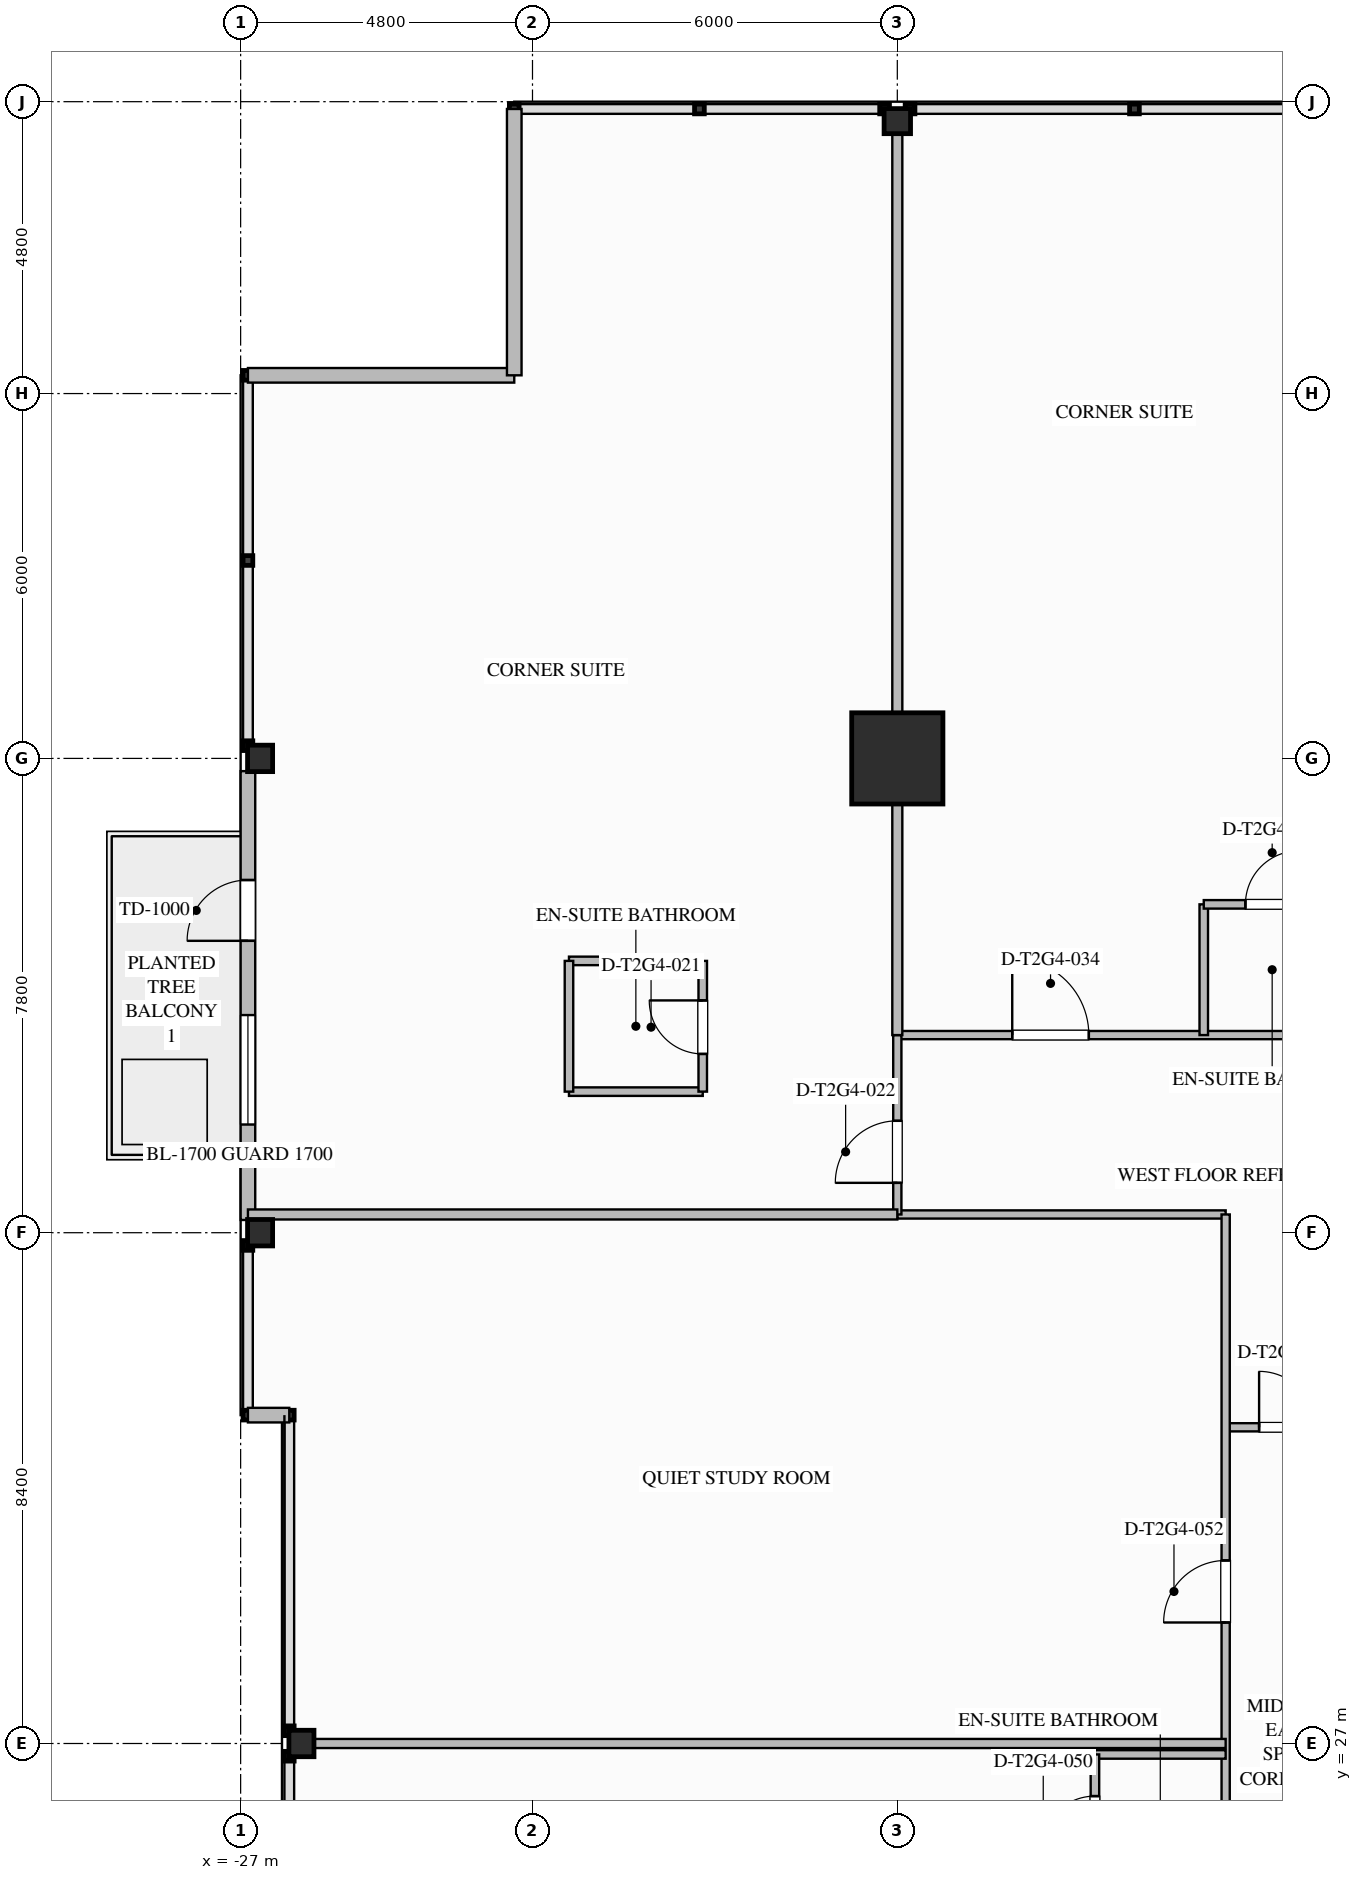
"""IFC4 building model, lengths in metres.
Left out: names, types, materials, properties, quantities, classifications, styles, units other than length and angle.
Written with IfcOpenShell. Run it as: python <this file> out.ifc"""

import sys

from ifc_helpers import new_model, si_unit, direction, frame, frame_2d, origin, origin_2d, place, context, subcontext, project, spatial, rectangle, i_section, extrude, element, fill, save


model = new_model("IFC4")
c1 = context("Model", 3, precision=1e-05, world=origin(), true_north=direction((0.0, 1.0)))
c2 = subcontext(c1, "Body", "Model", "MODEL_VIEW")
j1 = project(units=[si_unit("LENGTHUNIT", "METRE"), si_unit("PLANEANGLEUNIT", "RADIAN")], contexts=[c1])
p1 = place(None, origin())
s1 = spatial("IfcSite", under=j1, at=p1, CompositionType="ELEMENT")
p2 = place(p1, origin())
s2 = spatial("IfcBuilding", under=s1, at=p2, CompositionType="ELEMENT")
p3 = place(p2, frame((0.0, 0.0, 123.3)))
s3 = spatial("IfcBuildingStorey", under=s2, at=p3, CompositionType="ELEMENT", Elevation=123.3)
p4 = place(p3, frame((-16.2, 43.2, 0.0), z_axis=(0.0, 0.0, 1.0), x_axis=(1.0, 0.0, 0.0)))
e1 = element("IfcColumn", 1, at=p4, inside=s3, PredefinedType="COLUMN", context=c2, shape_type="SweptSolid", body=[
    extrude(rectangle(XDim=1.5, YDim=1.5, at=origin_2d()), origin(), (0.0, 0.0, 1.0), 3.5),
])
for number, where, z_axis, x_axis in (
    (2, (-26.0, 27.0, 0.0), (0.0, 0.0, 1.0), (1.0, 0.0, 0.0)),
    (3, (-26.68, 35.4, 0.0), (0.0, 0.0, 1.0), (1.0, 0.0, 0.0)),
    (4, (-26.68, 43.2, 0.0), (0.0, 0.0, 1.0), (1.0, 0.0, 0.0)),
    (5, (-16.2, 53.68, 0.0), (0.0, 0.0, 1.0), (0.0, 1.0, 0.0)),
):
    element("IfcColumn", number, at=place(p3, frame(where, z_axis=z_axis, x_axis=x_axis)), inside=s3, PredefinedType="COLUMN", context=c2, shape_type="SweptSolid", body=[
        extrude(i_section(OverallWidth=0.412, OverallDepth=0.435, WebThickness=0.036, FlangeThickness=0.057, FilletRadius=0.028, at=origin_2d()), origin(), (0.0, 0.0, 1.0), 3.497),
    ])
p5 = place(p3, frame((-26.88, 35.609, 0.0), z_axis=(0.0, 0.0, 1.0), x_axis=(0.0, 1.0, 0.0)))
e6 = element("IfcWall", 6, at=p5, inside=s3, PredefinedType="STANDARD", context=c2, shape_type="SweptSolid", body=[
    extrude(rectangle(XDim=7.381, YDim=0.24, at=frame_2d((3.69, 0.0))), origin(), (0.0, 0.0, 1.0), 2.629),
])
p6 = place(p5, frame((4.591, 0.0, 0.0)))
e7 = element("IfcOpeningElement", 7, at=p6, cuts=e6, PredefinedType="OPENING", context=c2, shape_type="SweptSolid", body=[
    extrude(rectangle(XDim=1.0, YDim=2.2, at=frame_2d((0.5, 1.1))), frame((0.0, 0.13, 0.0), z_axis=(0.0, -1.0, 0.0), x_axis=(1.0, 0.0, 0.0)), (0.0, 0.0, 1.0), 0.26),
])
p7 = place(p5, frame((1.57, 0.0, 0.75)))
e8 = element("IfcOpeningElement", 8, at=p7, cuts=e6, PredefinedType="OPENING", context=c2, shape_type="SweptSolid", body=[
    extrude(rectangle(XDim=1.8, YDim=1.779, at=frame_2d((0.9, 0.89))), frame((0.0, 0.13, 0.0), z_axis=(0.0, -1.0, 0.0), x_axis=(1.0, 0.0, 0.0)), (0.0, 0.0, 1.0), 0.26),
])
for number, where, z_axis, x_axis in (
    (9, (-26.88, 49.5, 0.0), (0.0, 0.0, 1.0), (1.0, 0.0, 0.0)),
    (10, (-22.5, 49.5, 0.0), (0.0, 0.0, 1.0), (0.0, 1.0, 0.0)),
):
    element("IfcWall", number, at=place(p3, frame(where, z_axis=z_axis, x_axis=x_axis)), inside=s3, PredefinedType="STANDARD", context=c2, shape_type="SweptSolid", body=[
        extrude(rectangle(XDim=4.38, YDim=0.24, at=frame_2d((2.19, 0.0))), origin(), (0.0, 0.0, 1.0), 3.24),
    ])
p8 = place(p3, frame((-26.2, 32.4, 0.0), z_axis=(0.0, 0.0, 1.0), x_axis=(-1.0, 0.0, 0.0)))
e11 = element("IfcWall", 11, at=p8, inside=s3, PredefinedType="STANDARD", context=c2, shape_type="SweptSolid", body=[
    extrude(rectangle(XDim=0.68, YDim=0.24, at=frame_2d((0.34, 0.0))), origin(), (0.0, 0.0, 1.0), 3.24),
])
p9 = place(p3, frame((-10.8, 32.2, 0.0), z_axis=(0.0, 0.0, 1.0), x_axis=(1.0, 0.0, 0.0)))
e12 = element("IfcWall", 12, at=p9, inside=s3, PredefinedType="PARTITIONING", context=c2, shape_type="SweptSolid", body=[
    extrude(rectangle(XDim=2.1, YDim=0.135, at=frame_2d((1.05, 0.0))), origin(), (0.0, 0.0, 1.0), 3.24),
])
p10 = place(p9, frame((0.55, 0.0, 0.0)))
e13 = element("IfcOpeningElement", 13, at=p10, cuts=e12, PredefinedType="OPENING", context=c2, shape_type="SweptSolid", body=[
    extrude(rectangle(XDim=0.92, YDim=2.1, at=frame_2d((0.46, 1.05))), frame((0.0, 0.077, 0.0), z_axis=(0.0, -1.0, 0.0), x_axis=(1.0, 0.0, 0.0)), (0.0, 0.0, 1.0), 0.155),
])
p11 = place(p3, frame((-16.2, 35.7, 0.0), z_axis=(0.0, 0.0, 1.0), x_axis=(1.0, 0.0, 0.0)))
e14 = element("IfcWall", 14, at=p11, inside=s3, PredefinedType="PARTITIONING", context=c2, shape_type="SweptSolid", body=[
    extrude(rectangle(XDim=5.4, YDim=0.135, at=frame_2d((2.7, 0.0))), origin(), (0.0, 0.0, 1.0), 3.24),
])
p12 = place(p3, frame((-16.2, 38.65, 0.0), z_axis=(0.0, 0.0, 1.0), x_axis=(1.0, 0.0, 0.0)))
e15 = element("IfcWall", 15, at=p12, inside=s3, PredefinedType="PARTITIONING", context=c2, shape_type="SweptSolid", body=[
    extrude(rectangle(XDim=24.9, YDim=0.135, at=frame_2d((12.45, 0.0))), origin(), (0.0, 0.0, 1.0), 3.24),
])
p13 = place(p12, frame((1.89, 0.0, 0.0)))
e16 = element("IfcOpeningElement", 16, at=p13, cuts=e15, PredefinedType="OPENING", context=c2, shape_type="SweptSolid", body=[
    extrude(rectangle(XDim=1.26, YDim=2.2, at=frame_2d((0.63, 1.1))), frame((0.0, 0.077, 0.0), z_axis=(0.0, -1.0, 0.0), x_axis=(1.0, 0.0, 0.0)), (0.0, 0.0, 1.0), 0.155),
])
p14 = place(p12, frame((8.265, 0.0, 0.0)))
e17 = element("IfcOpeningElement", 17, at=p14, cuts=e15, PredefinedType="OPENING", context=c2, shape_type="SweptSolid", body=[
    extrude(rectangle(XDim=0.96, YDim=2.15, at=frame_2d((0.48, 1.075))), frame((0.0, 0.077, 0.0), z_axis=(0.0, -1.0, 0.0), x_axis=(1.0, 0.0, 0.0)), (0.0, 0.0, 1.0), 0.155),
])
p15 = place(p12, frame((15.105, 0.0, 0.0)))
e18 = element("IfcOpeningElement", 18, at=p15, cuts=e15, PredefinedType="OPENING", context=c2, shape_type="SweptSolid", body=[
    extrude(rectangle(XDim=1.02, YDim=2.15, at=frame_2d((0.51, 1.075))), frame((0.0, 0.077, 0.0), z_axis=(0.0, -1.0, 0.0), x_axis=(1.0, 0.0, 0.0)), (0.0, 0.0, 1.0), 0.155),
])
p16 = place(p12, frame((19.995, 0.0, 0.0)))
e19 = element("IfcOpeningElement", 19, at=p16, cuts=e15, PredefinedType="OPENING", context=c2, shape_type="SweptSolid", body=[
    extrude(rectangle(XDim=1.26, YDim=2.2, at=frame_2d((0.63, 1.1))), frame((0.0, 0.077, 0.0), z_axis=(0.0, -1.0, 0.0), x_axis=(1.0, 0.0, 0.0)), (0.0, 0.0, 1.0), 0.155),
])
p17 = place(p3, frame((-10.8, 18.3, 0.0), z_axis=(0.0, 0.0, 1.0), x_axis=(0.0, 1.0, 0.0)))
e20 = element("IfcWall", 20, at=p17, inside=s3, PredefinedType="PARTITIONING", context=c2, shape_type="SweptSolid", body=[
    extrude(rectangle(XDim=17.4, YDim=0.135, at=frame_2d((8.7, 0.0))), origin(), (0.0, 0.0, 1.0), 3.24),
])
p18 = place(p17, frame((4.355, 0.0, 0.0)))
e21 = element("IfcOpeningElement", 21, at=p18, cuts=e20, PredefinedType="OPENING", context=c2, shape_type="SweptSolid", body=[
    extrude(rectangle(XDim=1.26, YDim=2.2, at=frame_2d((0.63, 1.1))), frame((0.0, 0.077, 0.0), z_axis=(0.0, -1.0, 0.0), x_axis=(1.0, 0.0, 0.0)), (0.0, 0.0, 1.0), 0.155),
])
p19 = place(p17, frame((10.69, 0.0, 0.0)))
e22 = element("IfcOpeningElement", 22, at=p19, cuts=e20, PredefinedType="OPENING", context=c2, shape_type="SweptSolid", body=[
    extrude(rectangle(XDim=1.02, YDim=2.15, at=frame_2d((0.51, 1.075))), frame((0.0, 0.077, 0.0), z_axis=(0.0, -1.0, 0.0), x_axis=(1.0, 0.0, 0.0)), (0.0, 0.0, 1.0), 0.155),
])
p20 = place(p3, frame((-16.2, 35.7, 0.0), z_axis=(0.0, 0.0, 1.0), x_axis=(0.0, 1.0, 0.0)))
e23 = element("IfcWall", 23, at=p20, inside=s3, PredefinedType="PARTITIONING", context=c2, shape_type="SweptSolid", body=[
    extrude(rectangle(XDim=2.95, YDim=0.135, at=frame_2d((1.475, 0.0))), origin(), (0.0, 0.0, 1.0), 2.53),
])
p21 = place(p20, frame((0.52, 0.0, 0.0)))
e24 = element("IfcOpeningElement", 24, at=p21, cuts=e23, PredefinedType="OPENING", context=c2, shape_type="SweptSolid", body=[
    extrude(rectangle(XDim=1.02, YDim=2.15, at=frame_2d((0.51, 1.075))), frame((0.0, 0.077, 0.0), z_axis=(0.0, -1.0, 0.0), x_axis=(1.0, 0.0, 0.0)), (0.0, 0.0, 1.0), 0.155),
])
p22 = place(p3, frame((-16.2, 38.65, 0.0), z_axis=(0.0, 0.0, 1.0), x_axis=(0.0, 1.0, 0.0)))
e25 = element("IfcWall", 25, at=p22, inside=s3, PredefinedType="PARTITIONING", context=c2, shape_type="SweptSolid", body=[
    extrude(rectangle(XDim=15.23, YDim=0.165, at=frame_2d((7.615, 0.0))), origin(), (0.0, 0.0, 1.0), 2.53),
])
p23 = place(p3, frame((-26.88, 35.7, 0.0), z_axis=(0.0, 0.0, 1.0), x_axis=(1.0, 0.0, 0.0)))
e26 = element("IfcWall", 26, at=p23, inside=s3, PredefinedType="PARTITIONING", context=c2, shape_type="SweptSolid", body=[
    extrude(rectangle(XDim=10.68, YDim=0.165, at=frame_2d((5.34, 0.0))), origin(), (0.0, 0.0, 1.0), 2.53),
])
for number, where, z_axis, x_axis in (
    (27, (-21.6, 37.72, 0.0), (0.0, 0.0, 1.0), (1.0, 0.0, 0.0)),
    (28, (-21.6, 39.87, 0.0), (0.0, 0.0, 1.0), (1.0, 0.0, 0.0)),
):
    element("IfcWall", number, at=place(p3, frame(where, z_axis=z_axis, x_axis=x_axis)), inside=s3, PredefinedType="PLUMBINGWALL", context=c2, shape_type="SweptSolid", body=[
        extrude(rectangle(XDim=2.2, YDim=0.14, at=frame_2d((1.1, 0.0))), origin(), (0.0, 0.0, 1.0), 3.24),
    ])
p24 = place(p3, frame((-21.6, 37.72, 0.0), z_axis=(0.0, 0.0, 1.0), x_axis=(0.0, 1.0, 0.0)))
e29 = element("IfcWall", 29, at=p24, inside=s3, PredefinedType="PLUMBINGWALL", context=c2, shape_type="SweptSolid", body=[
    extrude(rectangle(XDim=2.15, YDim=0.14, at=frame_2d((1.075, 0.0))), origin(), (0.0, 0.0, 1.0), 3.24),
])
p25 = place(p3, frame((-19.4, 37.72, 0.0), z_axis=(0.0, 0.0, 1.0), x_axis=(0.0, 1.0, 0.0)))
e30 = element("IfcWall", 30, at=p25, inside=s3, PredefinedType="PLUMBINGWALL", context=c2, shape_type="SweptSolid", body=[
    extrude(rectangle(XDim=2.15, YDim=0.14, at=frame_2d((1.075, 0.0))), origin(), (0.0, 0.0, 1.0), 3.24),
])
p26 = place(p25, frame((0.62, 0.0, 0.0)))
e31 = element("IfcOpeningElement", 31, at=p26, cuts=e30, PredefinedType="OPENING", context=c2, shape_type="SweptSolid", body=[
    extrude(rectangle(XDim=0.88, YDim=2.1, at=frame_2d((0.44, 1.05))), frame((0.0, 0.08, 0.0), z_axis=(0.0, -1.0, 0.0), x_axis=(1.0, 0.0, 0.0)), (0.0, 0.0, 1.0), 0.16),
])
p27 = place(p3, frame((-11.16, 38.65, 0.0), z_axis=(0.0, 0.0, 1.0), x_axis=(0.0, 1.0, 0.0)))
e32 = element("IfcWall", 32, at=p27, inside=s3, PredefinedType="PLUMBINGWALL", context=c2, shape_type="SweptSolid", body=[
    extrude(rectangle(XDim=2.15, YDim=0.14, at=frame_2d((1.075, 0.0))), origin(), (0.0, 0.0, 1.0), 3.24),
])
p28 = place(p3, frame((-11.16, 40.8, 0.0), z_axis=(0.0, 0.0, 1.0), x_axis=(1.0, 0.0, 0.0)))
e33 = element("IfcWall", 33, at=p28, inside=s3, PredefinedType="PLUMBINGWALL", context=c2, shape_type="SweptSolid", body=[
    extrude(rectangle(XDim=2.25, YDim=0.14, at=frame_2d((1.125, 0.0))), origin(), (0.0, 0.0, 1.0), 3.24),
])
p29 = place(p28, frame((0.685, 0.0, 0.0)))
e34 = element("IfcOpeningElement", 34, at=p29, cuts=e33, PredefinedType="OPENING", context=c2, shape_type="SweptSolid", body=[
    extrude(rectangle(XDim=0.88, YDim=2.1, at=frame_2d((0.44, 1.05))), frame((0.0, 0.08, 0.0), z_axis=(0.0, -1.0, 0.0), x_axis=(1.0, 0.0, 0.0)), (0.0, 0.0, 1.0), 0.16),
])
p30 = place(p3, frame((-26.2, 27.0, 0.0), z_axis=(0.0, 0.0, 1.0), x_axis=(1.0, 0.0, 0.0)))
e35 = element("IfcWall", 35, at=p30, inside=s3, PredefinedType="PARTITIONING", context=c2, shape_type="SweptSolid", body=[
    extrude(rectangle(XDim=15.4, YDim=0.15, at=frame_2d((7.7, 0.0))), origin(), (0.0, 0.0, 1.0), 2.53),
])
p31 = place(p3, frame((-10.8, 26.82, 0.0), z_axis=(0.0, 0.0, 1.0), x_axis=(-1.0, 0.0, 0.0)))
e36 = element("IfcWall", 36, at=p31, inside=s3, PredefinedType="PLUMBINGWALL", context=c2, shape_type="SweptSolid", body=[
    extrude(rectangle(XDim=2.15, YDim=0.14, at=frame_2d((1.075, 0.0))), origin(), (0.0, 0.0, 1.0), 2.617),
])
p32 = place(p3, frame((-12.95, 24.57, 0.0), z_axis=(0.0, 0.0, 1.0), x_axis=(0.0, 1.0, 0.0)))
e37 = element("IfcWall", 37, at=p32, inside=s3, PredefinedType="PLUMBINGWALL", context=c2, shape_type="SweptSolid", body=[
    extrude(rectangle(XDim=2.25, YDim=0.14, at=frame_2d((1.125, 0.0))), origin(), (0.0, 0.0, 1.0), 3.24),
])
p33 = place(p32, frame((0.685, 0.0, 0.0)))
e38 = element("IfcOpeningElement", 38, at=p33, cuts=e37, PredefinedType="OPENING", context=c2, shape_type="SweptSolid", body=[
    extrude(rectangle(XDim=0.88, YDim=2.1, at=frame_2d((0.44, 1.05))), frame((0.0, 0.08, 0.0), z_axis=(0.0, -1.0, 0.0), x_axis=(1.0, 0.0, 0.0)), (0.0, 0.0, 1.0), 0.16),
])
p34 = place(p6, origin())
e39 = element("IfcDoor", 39, at=p34, inside=s3, OperationType="SINGLE_SWING_LEFT", PredefinedType="DOOR", context=c2, shape_type="SweptSolid", body=[
    extrude(rectangle(XDim=1.0, YDim=2.2, at=frame_2d((0.5, 1.1))), frame((0.0, 0.025, 0.0), z_axis=(0.0, -1.0, 0.0), x_axis=(1.0, 0.0, 0.0)), (0.0, 0.0, 1.0), 0.05),
])
fill(e7, e39)
p35 = place(p7, origin())
e40 = element("IfcWindow", 40, at=p35, inside=s3, PartitioningType="SINGLE_PANEL", PredefinedType="WINDOW", context=c2, shape_type="SweptSolid", body=[
    extrude(rectangle(XDim=1.8, YDim=1.779, at=frame_2d((0.9, 0.89))), frame((0.0, 0.03, 0.0), z_axis=(0.0, -1.0, 0.0), x_axis=(1.0, 0.0, 0.0)), (0.0, 0.0, 1.0), 0.06),
])
fill(e8, e40)
p36 = place(p10, origin())
e41 = element("IfcDoor", 41, at=p36, inside=s3, OperationType="SINGLE_SWING_LEFT", PredefinedType="DOOR", context=c2, shape_type="SweptSolid", body=[
    extrude(rectangle(XDim=0.92, YDim=2.1, at=frame_2d((0.46, 1.05))), frame((0.0, 0.025, 0.0), z_axis=(0.0, -1.0, 0.0), x_axis=(1.0, 0.0, 0.0)), (0.0, 0.0, 1.0), 0.05),
])
fill(e13, e41)
p37 = place(p26, origin())
e42 = element("IfcDoor", 42, at=p37, inside=s3, OperationType="SINGLE_SWING_RIGHT", PredefinedType="DOOR", context=c2, shape_type="SweptSolid", body=[
    extrude(rectangle(XDim=0.88, YDim=2.1, at=frame_2d((0.44, 1.05))), frame((0.0, 0.025, 0.0), z_axis=(0.0, -1.0, 0.0), x_axis=(1.0, 0.0, 0.0)), (0.0, 0.0, 1.0), 0.05),
])
fill(e31, e42)
p38 = place(p21, origin())
e43 = element("IfcDoor", 43, at=p38, inside=s3, OperationType="SINGLE_SWING_LEFT", PredefinedType="DOOR", context=c2, shape_type="SweptSolid", body=[
    extrude(rectangle(XDim=1.02, YDim=2.15, at=frame_2d((0.51, 1.075))), frame((0.0, 0.025, 0.0), z_axis=(0.0, -1.0, 0.0), x_axis=(1.0, 0.0, 0.0)), (0.0, 0.0, 1.0), 0.05),
])
fill(e24, e43)
p39 = place(p29, origin())
e44 = element("IfcDoor", 44, at=p39, inside=s3, OperationType="SINGLE_SWING_RIGHT", PredefinedType="DOOR", context=c2, shape_type="SweptSolid", body=[
    extrude(rectangle(XDim=0.88, YDim=2.1, at=frame_2d((0.44, 1.05))), frame((0.0, 0.025, 0.0), z_axis=(0.0, -1.0, 0.0), x_axis=(1.0, 0.0, 0.0)), (0.0, 0.0, 1.0), 0.05),
])
fill(e34, e44)
p40 = place(p13, origin())
e45 = element("IfcDoor", 45, at=p40, inside=s3, OperationType="SINGLE_SWING_LEFT", PredefinedType="DOOR", context=c2, shape_type="SweptSolid", body=[
    extrude(rectangle(XDim=1.26, YDim=2.2, at=frame_2d((0.63, 1.1))), frame((0.0, 0.025, 0.0), z_axis=(0.0, -1.0, 0.0), x_axis=(1.0, 0.0, 0.0)), (0.0, 0.0, 1.0), 0.05),
])
fill(e16, e45)
p41 = place(p33, origin())
e46 = element("IfcDoor", 46, at=p41, inside=s3, OperationType="SINGLE_SWING_LEFT", PredefinedType="DOOR", context=c2, shape_type="SweptSolid", body=[
    extrude(rectangle(XDim=0.88, YDim=2.1, at=frame_2d((0.44, 1.05))), frame((0.0, 0.025, 0.0), z_axis=(0.0, -1.0, 0.0), x_axis=(1.0, 0.0, 0.0)), (0.0, 0.0, 1.0), 0.05),
])
fill(e38, e46)
p42 = place(p19, origin())
e47 = element("IfcDoor", 47, at=p42, inside=s3, OperationType="SINGLE_SWING_LEFT", PredefinedType="DOOR", context=c2, shape_type="SweptSolid", body=[
    extrude(rectangle(XDim=1.02, YDim=2.15, at=frame_2d((0.51, 1.075))), frame((0.0, 0.025, 0.0), z_axis=(0.0, -1.0, 0.0), x_axis=(1.0, 0.0, 0.0)), (0.0, 0.0, 1.0), 0.05),
])
fill(e22, e47)
save(model, sys.argv[1])
